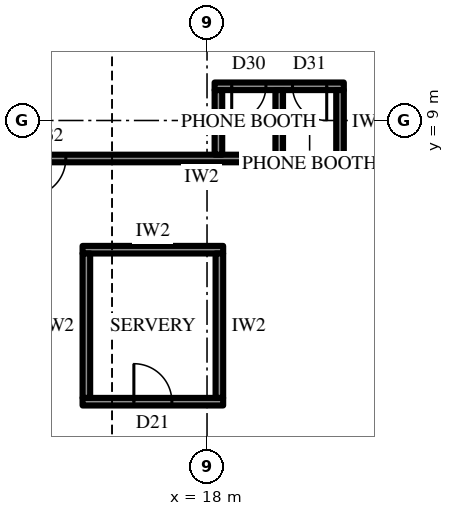
"""IFC4 building model, lengths in metres.
Left out: names, types, materials, properties, quantities, classifications, styles, units other than length and angle.
Written with IfcOpenShell. Run it as: python <this file> out.ifc"""

import sys

from ifc_helpers import new_model, si_unit, direction, frame, frame_2d, origin, place, context, subcontext, project, spatial, rectangle, extrude, element, fill, save


model = new_model("IFC4")
c1 = context("Model", 3, precision=1e-05, world=origin(), true_north=direction((0.0, 1.0)))
c2 = subcontext(c1, "Body", "Model", "MODEL_VIEW")
j1 = project(units=[si_unit("LENGTHUNIT", "METRE"), si_unit("PLANEANGLEUNIT", "RADIAN")], contexts=[c1])
p1 = place(None, origin())
s1 = spatial("IfcSite", under=j1, at=p1, CompositionType="ELEMENT")
p2 = place(p1, origin())
s2 = spatial("IfcBuilding", under=s1, at=p2, CompositionType="ELEMENT")
p3 = place(p2, frame((0.0, 0.0, 311.5)))
s3 = spatial("IfcBuildingStorey", under=s2, at=p3, CompositionType="ELEMENT", Elevation=311.5)
p4 = place(p3, frame((14.725, 1.6, 0.0), z_axis=(0.0, 0.0, 1.0), x_axis=(1.0, 0.0, 0.0)))
e1 = element("IfcWall", 1, at=p4, inside=s3, PredefinedType="PARTITIONING", context=c2, shape_type="SweptSolid", body=[
    extrude(rectangle(XDim=3.7, YDim=0.2, at=frame_2d((1.85, 0.0))), origin(), (0.0, 0.0, 1.0), 4.0),
])
p5 = place(p4, frame((1.35, 0.0, 0.0)))
e2 = element("IfcOpeningElement", 2, at=p5, cuts=e1, PredefinedType="OPENING", context=c2, shape_type="SweptSolid", body=[
    extrude(rectangle(XDim=1.0, YDim=2.2, at=frame_2d((0.5, 1.1))), frame((0.0, 0.11, 0.0), z_axis=(0.0, -1.0, 0.0), x_axis=(1.0, 0.0, 0.0)), (0.0, 0.0, 1.0), 0.22),
])
p6 = place(p3, frame((14.725, 5.6, 0.0), z_axis=(0.0, 0.0, 1.0), x_axis=(1.0, 0.0, 0.0)))
e3 = element("IfcWall", 3, at=p6, inside=s3, PredefinedType="PARTITIONING", context=c2, shape_type="SweptSolid", body=[
    extrude(rectangle(XDim=3.7, YDim=0.2, at=frame_2d((1.85, 0.0))), origin(), (0.0, 0.0, 1.0), 4.0),
])
for number, where, z_axis, x_axis in (
    (4, (14.825, 1.7, 0.0), (0.0, 0.0, 1.0), (0.0, 1.0, 0.0)),
    (5, (18.325, 1.7, 0.0), (0.0, 0.0, 1.0), (0.0, 1.0, 0.0)),
):
    element("IfcWall", number, at=place(p3, frame(where, z_axis=z_axis, x_axis=x_axis)), inside=s3, PredefinedType="PARTITIONING", context=c2, shape_type="SweptSolid", body=[
        extrude(rectangle(XDim=3.8, YDim=0.2, at=frame_2d((1.9, 0.0))), origin(), (0.0, 0.0, 1.0), 4.0),
    ])
p7 = place(p3, frame((12.425, 8.0, 0.0), z_axis=(0.0, 0.0, 1.0), x_axis=(1.0, 0.0, 0.0)))
e6 = element("IfcWall", 6, at=p7, inside=s3, PredefinedType="PARTITIONING", context=c2, shape_type="SweptSolid", body=[
    extrude(rectangle(XDim=13.59, YDim=0.2, at=frame_2d((6.795, 0.0))), origin(), (0.0, 0.0, 1.0), 4.0),
])
p8 = place(p7, frame((0.859, 0.0, 0.0)))
e7 = element("IfcOpeningElement", 7, at=p8, cuts=e6, PredefinedType="OPENING", context=c2, shape_type="SweptSolid", body=[
    extrude(rectangle(XDim=1.0, YDim=2.2, at=frame_2d((0.5, 1.1))), frame((0.0, 0.11, 0.0), z_axis=(0.0, -1.0, 0.0), x_axis=(1.0, 0.0, 0.0)), (0.0, 0.0, 1.0), 0.22),
])
p9 = place(p3, frame((18.2, 9.9, 0.0), z_axis=(0.0, 0.0, 1.0), x_axis=(1.0, 0.0, 0.0)))
e8 = element("IfcWall", 8, at=p9, inside=s3, PredefinedType="PARTITIONING", context=c2, shape_type="SweptSolid", body=[
    extrude(rectangle(XDim=3.4, YDim=0.2, at=frame_2d((1.7, 0.0))), origin(), (0.0, 0.0, 1.0), 4.0),
])
p10 = place(p9, frame((0.45, 0.0, 0.0)))
e9 = element("IfcOpeningElement", 9, at=p10, cuts=e8, PredefinedType="OPENING", context=c2, shape_type="SweptSolid", body=[
    extrude(rectangle(XDim=0.9, YDim=2.2, at=frame_2d((0.45, 1.1))), frame((0.0, 0.11, 0.0), z_axis=(0.0, -1.0, 0.0), x_axis=(1.0, 0.0, 0.0)), (0.0, 0.0, 1.0), 0.22),
])
p11 = place(p9, frame((2.05, 0.0, 0.0)))
e10 = element("IfcOpeningElement", 10, at=p11, cuts=e8, PredefinedType="OPENING", context=c2, shape_type="SweptSolid", body=[
    extrude(rectangle(XDim=0.9, YDim=2.2, at=frame_2d((0.45, 1.1))), frame((0.0, 0.11, 0.0), z_axis=(0.0, -1.0, 0.0), x_axis=(1.0, 0.0, 0.0)), (0.0, 0.0, 1.0), 0.22),
])
for number, where, z_axis, x_axis in (
    (11, (18.3, 8.1, 0.0), (0.0, 0.0, 1.0), (0.0, 1.0, 0.0)),
    (12, (19.9, 8.1, 0.0), (0.0, 0.0, 1.0), (0.0, 1.0, 0.0)),
    (13, (21.5, 8.1, 0.0), (0.0, 0.0, 1.0), (0.0, 1.0, 0.0)),
):
    element("IfcWall", number, at=place(p3, frame(where, z_axis=z_axis, x_axis=x_axis)), inside=s3, PredefinedType="PARTITIONING", context=c2, shape_type="SweptSolid", body=[
        extrude(rectangle(XDim=1.7, YDim=0.2, at=frame_2d((0.85, 0.0))), origin(), (0.0, 0.0, 1.0), 4.0),
    ])
p12 = place(p5, origin())
e14 = element("IfcDoor", 14, at=p12, inside=s3, OperationType="SINGLE_SWING_RIGHT", PredefinedType="DOOR", context=c2, shape_type="SweptSolid", body=[
    extrude(rectangle(XDim=1.0, YDim=2.2, at=frame_2d((0.5, 1.1))), frame((0.0, 0.025, 0.0), z_axis=(0.0, -1.0, 0.0), x_axis=(1.0, 0.0, 0.0)), (0.0, 0.0, 1.0), 0.05),
])
fill(e2, e14)
p13 = place(p8, frame((1.0, 0.0, 0.0), z_axis=(0.0, 0.0, 1.0), x_axis=(-1.0, 0.0, 0.0)))
e15 = element("IfcDoor", 15, at=p13, inside=s3, OperationType="SINGLE_SWING_LEFT", PredefinedType="DOOR", context=c2, shape_type="SweptSolid", body=[
    extrude(rectangle(XDim=1.0, YDim=2.2, at=frame_2d((0.5, 1.1))), frame((0.0, 0.025, 0.0), z_axis=(0.0, -1.0, 0.0), x_axis=(1.0, 0.0, 0.0)), (0.0, 0.0, 1.0), 0.05),
])
fill(e7, e15)
p14 = place(p10, frame((0.9, 0.0, 0.0), z_axis=(0.0, 0.0, 1.0), x_axis=(-1.0, 0.0, 0.0)))
e16 = element("IfcDoor", 16, at=p14, inside=s3, OperationType="SINGLE_SWING_LEFT", PredefinedType="DOOR", context=c2, shape_type="SweptSolid", body=[
    extrude(rectangle(XDim=0.9, YDim=2.2, at=frame_2d((0.45, 1.1))), frame((0.0, 0.025, 0.0), z_axis=(0.0, -1.0, 0.0), x_axis=(1.0, 0.0, 0.0)), (0.0, 0.0, 1.0), 0.05),
])
fill(e9, e16)
p15 = place(p11, frame((0.9, 0.0, 0.0), z_axis=(0.0, 0.0, 1.0), x_axis=(-1.0, 0.0, 0.0)))
e17 = element("IfcDoor", 17, at=p15, inside=s3, OperationType="SINGLE_SWING_RIGHT", PredefinedType="DOOR", context=c2, shape_type="SweptSolid", body=[
    extrude(rectangle(XDim=0.9, YDim=2.2, at=frame_2d((0.45, 1.1))), frame((0.0, 0.025, 0.0), z_axis=(0.0, -1.0, 0.0), x_axis=(1.0, 0.0, 0.0)), (0.0, 0.0, 1.0), 0.05),
])
fill(e10, e17)
save(model, sys.argv[1])
